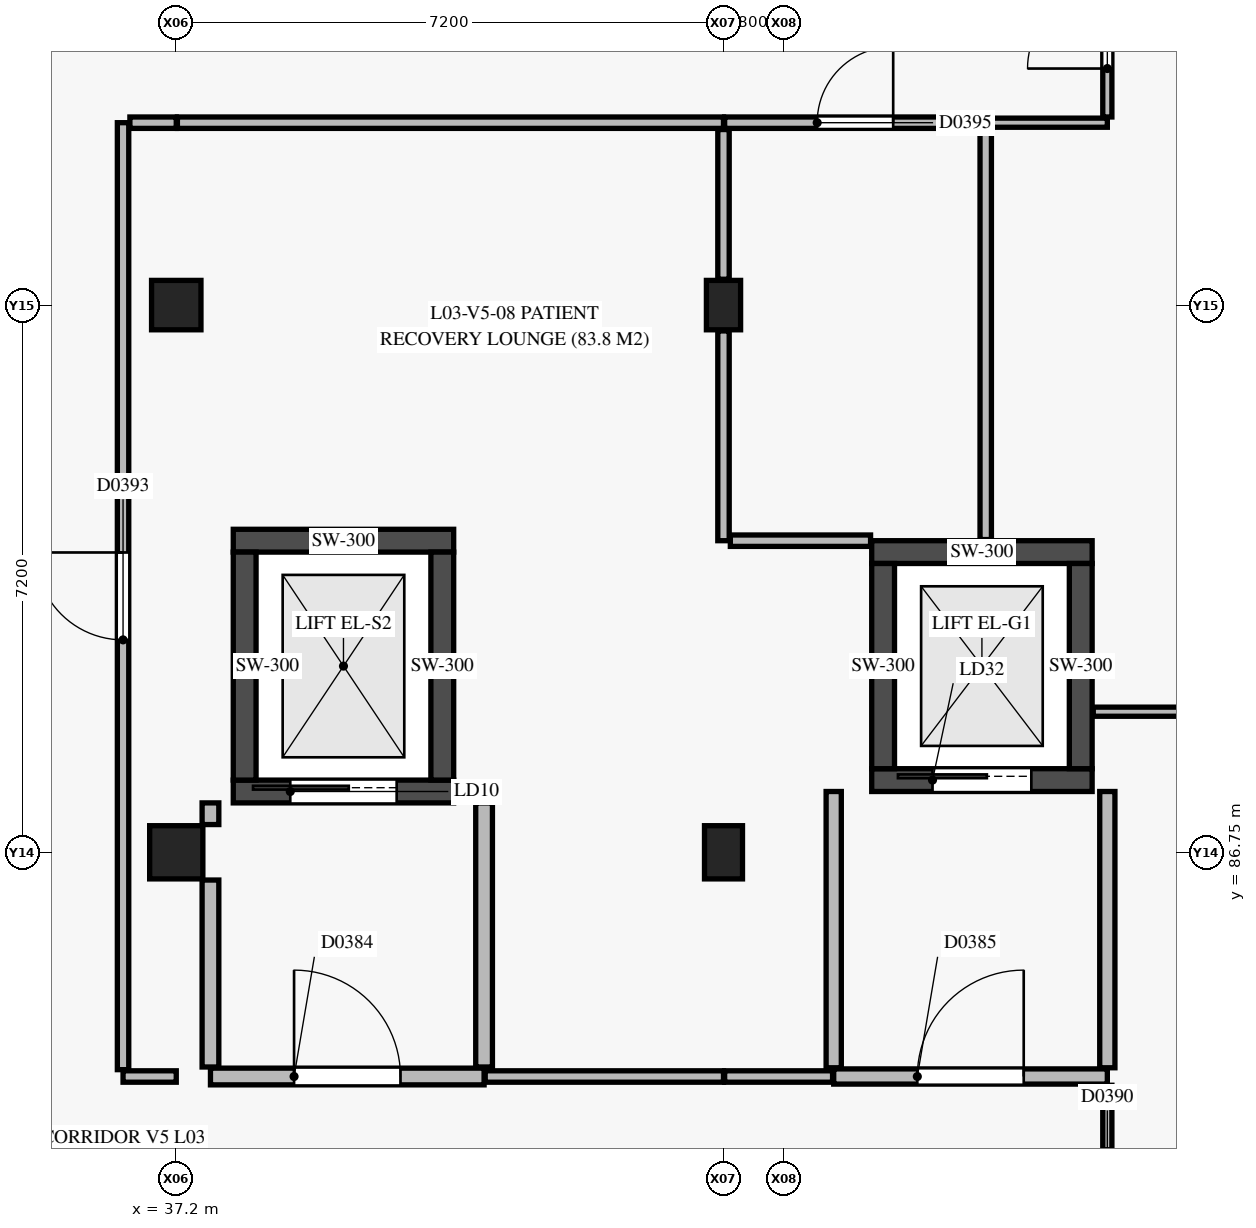
"""IFC4 building model, lengths in metres.
Left out: names, types, materials, properties, quantities, classifications, styles, units other than length and angle.
Written with IfcOpenShell. Run it as: python <this file> out.ifc"""

import sys

from ifc_helpers import new_model, si_unit, direction, frame, frame_2d, origin, origin_2d, place, context, subcontext, project, spatial, rectangle, extrude, element, fill, save


model = new_model("IFC4")
c1 = context("Model", 3, precision=1e-05, world=origin(), true_north=direction((0.0, 1.0)))
c2 = subcontext(c1, "Body", "Model", "MODEL_VIEW")
j1 = project(units=[si_unit("LENGTHUNIT", "METRE"), si_unit("PLANEANGLEUNIT", "RADIAN")], contexts=[c1])
p1 = place(None, origin())
s1 = spatial("IfcSite", under=j1, at=p1, CompositionType="ELEMENT")
p2 = place(p1, origin())
s2 = spatial("IfcBuilding", under=s1, at=p2, CompositionType="ELEMENT")
p3 = place(p2, frame((0.0, 0.0, 13.2)))
s3 = spatial("IfcBuildingStorey", under=s2, at=p3, CompositionType="ELEMENT", Elevation=13.2)
p4 = place(p3, frame((37.2, 86.75, 0.0), z_axis=(0.0, 0.0, 1.0), x_axis=(1.0, 0.0, 0.0)))
e1 = element("IfcColumn", 1, at=p4, inside=s3, PredefinedType="COLUMN", context=c2, shape_type="SweptSolid", body=[
    extrude(rectangle(XDim=0.7, YDim=0.7, at=origin_2d()), origin(), (0.0, 0.0, 1.0), 4.05),
])
p5 = place(p3, frame((37.2, 93.95, 0.0), z_axis=(0.0, 0.0, 1.0), x_axis=(1.0, 0.0, 0.0)))
e2 = element("IfcColumn", 2, at=p5, inside=s3, PredefinedType="COLUMN", context=c2, shape_type="SweptSolid", body=[
    extrude(rectangle(XDim=0.65, YDim=0.65, at=origin_2d()), origin(), (0.0, 0.0, 1.0), 4.05),
])
p6 = place(p3, frame((44.4, 86.75, 0.0), z_axis=(0.0, 0.0, 1.0), x_axis=(1.0, 0.0, 0.0)))
e3 = element("IfcColumn", 3, at=p6, inside=s3, PredefinedType="COLUMN", context=c2, shape_type="SweptSolid", body=[
    extrude(rectangle(XDim=0.5, YDim=0.7, at=origin_2d()), origin(), (0.0, 0.0, 1.0), 4.05),
])
p7 = place(p3, frame((44.4, 93.95, 0.0), z_axis=(0.0, 0.0, 1.0), x_axis=(1.0, 0.0, 0.0)))
e4 = element("IfcColumn", 4, at=p7, inside=s3, PredefinedType="COLUMN", context=c2, shape_type="SweptSolid", body=[
    extrude(rectangle(XDim=0.45, YDim=0.65, at=origin_2d()), origin(), (0.0, 0.0, 1.0), 4.05),
])
p8 = place(p3, frame((37.95, 87.55, 0.0), z_axis=(0.0, 0.0, 1.0), x_axis=(1.0, 0.0, 0.0)))
e5 = element("IfcWall", 5, at=p8, inside=s3, PredefinedType="SHEAR", context=c2, shape_type="SweptSolid", body=[
    extrude(rectangle(XDim=2.9, YDim=0.3, at=frame_2d((1.45, 0.0))), origin(), (0.0, 0.0, 1.0), 3.95),
])
p9 = place(p8, frame((0.75, 0.0, 0.0)))
e6 = element("IfcOpeningElement", 6, at=p9, cuts=e5, PredefinedType="OPENING", context=c2, shape_type="SweptSolid", body=[
    extrude(rectangle(XDim=1.4, YDim=2.15, at=frame_2d((0.7, 1.075))), frame((0.0, 0.16, 0.0), z_axis=(0.0, -1.0, 0.0), x_axis=(1.0, 0.0, 0.0)), (0.0, 0.0, 1.0), 0.32),
])
p10 = place(p3, frame((37.95, 90.85, 0.0), z_axis=(0.0, 0.0, 1.0), x_axis=(1.0, 0.0, 0.0)))
e7 = element("IfcWall", 7, at=p10, inside=s3, PredefinedType="SHEAR", context=c2, shape_type="SweptSolid", body=[
    extrude(rectangle(XDim=2.9, YDim=0.3, at=frame_2d((1.45, 0.0))), origin(), (0.0, 0.0, 1.0), 3.95),
])
for number, where, z_axis, x_axis in (
    (8, (38.1, 87.7, 0.0), (0.0, 0.0, 1.0), (0.0, 1.0, 0.0)),
    (9, (40.7, 87.7, 0.0), (0.0, 0.0, 1.0), (0.0, 1.0, 0.0)),
):
    element("IfcWall", number, at=place(p3, frame(where, z_axis=z_axis, x_axis=x_axis)), inside=s3, PredefinedType="SHEAR", context=c2, shape_type="SweptSolid", body=[
        extrude(rectangle(XDim=3.0, YDim=0.3, at=frame_2d((1.5, 0.0))), origin(), (0.0, 0.0, 1.0), 3.95),
    ])
p11 = place(p3, frame((46.35, 87.7, 0.0), z_axis=(0.0, 0.0, 1.0), x_axis=(1.0, 0.0, 0.0)))
e10 = element("IfcWall", 10, at=p11, inside=s3, PredefinedType="SHEAR", context=c2, shape_type="SweptSolid", body=[
    extrude(rectangle(XDim=2.9, YDim=0.3, at=frame_2d((1.45, 0.0))), origin(), (0.0, 0.0, 1.0), 3.95),
])
p12 = place(p11, frame((0.8, 0.0, 0.0)))
e11 = element("IfcOpeningElement", 11, at=p12, cuts=e10, PredefinedType="OPENING", context=c2, shape_type="SweptSolid", body=[
    extrude(rectangle(XDim=1.3, YDim=2.15, at=frame_2d((0.65, 1.075))), frame((0.0, 0.16, 0.0), z_axis=(0.0, -1.0, 0.0), x_axis=(1.0, 0.0, 0.0)), (0.0, 0.0, 1.0), 0.32),
])
p13 = place(p3, frame((46.35, 90.7, 0.0), z_axis=(0.0, 0.0, 1.0), x_axis=(1.0, 0.0, 0.0)))
e12 = element("IfcWall", 12, at=p13, inside=s3, PredefinedType="SHEAR", context=c2, shape_type="SweptSolid", body=[
    extrude(rectangle(XDim=2.9, YDim=0.3, at=frame_2d((1.45, 0.0))), origin(), (0.0, 0.0, 1.0), 3.95),
])
for number, where, z_axis, x_axis in (
    (13, (46.5, 87.85, 0.0), (0.0, 0.0, 1.0), (0.0, 1.0, 0.0)),
    (14, (49.1, 87.85, 0.0), (0.0, 0.0, 1.0), (0.0, 1.0, 0.0)),
):
    element("IfcWall", number, at=place(p3, frame(where, z_axis=z_axis, x_axis=x_axis)), inside=s3, PredefinedType="SHEAR", context=c2, shape_type="SweptSolid", body=[
        extrude(rectangle(XDim=2.7, YDim=0.3, at=frame_2d((1.35, 0.0))), origin(), (0.0, 0.0, 1.0), 3.95),
    ])
p14 = place(p3, frame((37.65, 83.8, 0.0), z_axis=(0.0, 0.0, 1.0), x_axis=(1.0, 0.0, 0.0)))
e15 = element("IfcWall", 15, at=p14, inside=s3, PredefinedType="PARTITIONING", context=c2, shape_type="SweptSolid", body=[
    extrude(rectangle(XDim=3.6, YDim=0.22, at=frame_2d((1.8, 0.0))), origin(), (0.0, 0.0, 1.0), 3.95),
])
p15 = place(p14, frame((1.1, 0.0, 0.0)))
e16 = element("IfcOpeningElement", 16, at=p15, cuts=e15, PredefinedType="OPENING", context=c2, shape_type="SweptSolid", body=[
    extrude(rectangle(XDim=1.4, YDim=2.2, at=frame_2d((0.7, 1.1))), frame((0.0, 0.12, 0.0), z_axis=(0.0, -1.0, 0.0), x_axis=(1.0, 0.0, 0.0)), (0.0, 0.0, 1.0), 0.24),
])
p16 = place(p3, frame((45.85, 83.8, 0.0), z_axis=(0.0, 0.0, 1.0), x_axis=(1.0, 0.0, 0.0)))
e17 = element("IfcWall", 17, at=p16, inside=s3, PredefinedType="PARTITIONING", context=c2, shape_type="SweptSolid", body=[
    extrude(rectangle(XDim=3.6, YDim=0.2, at=frame_2d((1.8, 0.0))), origin(), (0.0, 0.0, 1.0), 3.95),
])
p17 = place(p16, frame((1.1, 0.0, 0.0)))
e18 = element("IfcOpeningElement", 18, at=p17, cuts=e17, PredefinedType="OPENING", context=c2, shape_type="SweptSolid", body=[
    extrude(rectangle(XDim=1.4, YDim=2.2, at=frame_2d((0.7, 1.1))), frame((0.0, 0.11, 0.0), z_axis=(0.0, -1.0, 0.0), x_axis=(1.0, 0.0, 0.0)), (0.0, 0.0, 1.0), 0.22),
])
p18 = place(p3, frame((41.25, 83.925, 0.0), z_axis=(0.0, 0.0, 1.0), x_axis=(0.0, 1.0, 0.0)))
e19 = element("IfcWall", 19, at=p18, inside=s3, PredefinedType="PARTITIONING", context=c2, shape_type="SweptSolid", body=[
    extrude(rectangle(XDim=3.475, YDim=0.22, at=frame_2d((1.737, 0.0))), origin(), (0.0, 0.0, 1.0), 3.47),
])
p19 = place(p3, frame((37.65, 83.925, 0.0), z_axis=(0.0, 0.0, 1.0), x_axis=(0.0, 1.0, 0.0)))
e20 = element("IfcWall", 20, at=p19, inside=s3, PredefinedType="PARTITIONING", context=c2, shape_type="SweptSolid", body=[
    extrude(rectangle(XDim=2.46, YDim=0.22, at=frame_2d((1.23, 0.0))), origin(), (0.0, 0.0, 1.0), 3.95),
])
p20 = place(p3, frame((37.65, 87.115, 0.0), z_axis=(0.0, 0.0, 1.0), x_axis=(0.0, 1.0, 0.0)))
e21 = element("IfcWall", 21, at=p20, inside=s3, PredefinedType="PARTITIONING", context=c2, shape_type="SweptSolid", body=[
    extrude(rectangle(XDim=0.285, YDim=0.22, at=frame_2d((0.143, 0.0))), origin(), (0.0, 0.0, 1.0), 3.95),
])
for number, where, z_axis, x_axis in (
    (22, (49.45, 83.915, 0.0), (0.0, 0.0, 1.0), (0.0, 1.0, 0.0)),
    (23, (45.85, 83.915, 0.0), (0.0, 0.0, 1.0), (0.0, 1.0, 0.0)),
):
    element("IfcWall", number, at=place(p3, frame(where, z_axis=z_axis, x_axis=x_axis)), inside=s3, PredefinedType="PARTITIONING", context=c2, shape_type="SweptSolid", body=[
        extrude(rectangle(XDim=3.635, YDim=0.2, at=frame_2d((1.817, 0.0))), origin(), (0.0, 0.0, 1.0), 3.22),
    ])
p21 = place(p3, frame((41.265, 83.8, 0.0), z_axis=(0.0, 0.0, 1.0), x_axis=(1.0, 0.0, 0.0)))
e24 = element("IfcWall", 24, at=p21, inside=s3, PredefinedType="PARTITIONING", context=c2, shape_type="SweptSolid", body=[
    extrude(rectangle(XDim=3.135, YDim=0.15, at=frame_2d((1.567, 0.0))), origin(), (0.0, 0.0, 1.0), 3.95),
])
p22 = place(p3, frame((36.5, 83.8, 0.0), z_axis=(0.0, 0.0, 1.0), x_axis=(1.0, 0.0, 0.0)))
e25 = element("IfcWall", 25, at=p22, inside=s3, PredefinedType="PARTITIONING", context=c2, shape_type="SweptSolid", body=[
    extrude(rectangle(XDim=0.7, YDim=0.15, at=frame_2d((0.35, 0.0))), origin(), (0.0, 0.0, 1.0), 3.95),
])
p23 = place(p3, frame((36.5, 83.89, 0.0), z_axis=(0.0, 0.0, 1.0), x_axis=(0.0, 1.0, 0.0)))
e26 = element("IfcWall", 26, at=p23, inside=s3, PredefinedType="PARTITIONING", context=c2, shape_type="SweptSolid", body=[
    extrude(rectangle(XDim=12.46, YDim=0.15, at=frame_2d((6.23, 0.0))), origin(), (0.0, 0.0, 1.0), 3.22),
])
p24 = place(p23, frame((5.655, 0.0, 0.0)))
e27 = element("IfcOpeningElement", 27, at=p24, cuts=e26, PredefinedType="OPENING", context=c2, shape_type="SweptSolid", body=[
    extrude(rectangle(XDim=1.15, YDim=2.15, at=frame_2d((0.575, 1.075))), frame((0.0, 0.085, 0.0), z_axis=(0.0, -1.0, 0.0), x_axis=(1.0, 0.0, 0.0)), (0.0, 0.0, 1.0), 0.17),
])
p25 = place(p3, frame((36.59, 96.35, 0.0), z_axis=(0.0, 0.0, 1.0), x_axis=(1.0, 0.0, 0.0)))
e28 = element("IfcWall", 28, at=p25, inside=s3, PredefinedType="PARTITIONING", context=c2, shape_type="SweptSolid", body=[
    extrude(rectangle(XDim=0.61, YDim=0.15, at=frame_2d((0.305, 0.0))), origin(), (0.0, 0.0, 1.0), 3.95),
])
p26 = place(p3, frame((37.215, 96.35, 0.0), z_axis=(0.0, 0.0, 1.0), x_axis=(1.0, 0.0, 0.0)))
e29 = element("IfcWall", 29, at=p26, inside=s3, PredefinedType="PARTITIONING", context=c2, shape_type="SweptSolid", body=[
    extrude(rectangle(XDim=7.185, YDim=0.15, at=frame_2d((3.592, 0.0))), origin(), (0.0, 0.0, 1.0), 3.95),
])
p27 = place(p3, frame((44.415, 83.8, 0.0), z_axis=(0.0, 0.0, 1.0), x_axis=(1.0, 0.0, 0.0)))
e30 = element("IfcWall", 30, at=p27, inside=s3, PredefinedType="PARTITIONING", context=c2, shape_type="SweptSolid", body=[
    extrude(rectangle(XDim=1.42, YDim=0.15, at=frame_2d((0.71, 0.0))), origin(), (0.0, 0.0, 1.0), 3.95),
])
p28 = place(p3, frame((44.415, 96.35, 0.0), z_axis=(0.0, 0.0, 1.0), x_axis=(1.0, 0.0, 0.0)))
e31 = element("IfcWall", 31, at=p28, inside=s3, PredefinedType="PARTITIONING", context=c2, shape_type="SweptSolid", body=[
    extrude(rectangle(XDim=3.435, YDim=0.15, at=frame_2d((1.718, 0.0))), origin(), (0.0, 0.0, 1.0), 3.95),
])
p29 = place(p28, frame((1.218, 0.0, 0.0)))
e32 = element("IfcOpeningElement", 32, at=p29, cuts=e31, PredefinedType="OPENING", context=c2, shape_type="SweptSolid", body=[
    extrude(rectangle(XDim=1.0, YDim=2.15, at=frame_2d((0.5, 1.075))), frame((0.0, 0.085, 0.0), z_axis=(0.0, -1.0, 0.0), x_axis=(1.0, 0.0, 0.0)), (0.0, 0.0, 1.0), 0.17),
])
p30 = place(p3, frame((49.45, 81.475, 0.0), z_axis=(0.0, 0.0, 1.0), x_axis=(0.0, 1.0, 0.0)))
e33 = element("IfcWall", 33, at=p30, inside=s3, PredefinedType="PARTITIONING", context=c2, shape_type="SweptSolid", body=[
    extrude(rectangle(XDim=2.21, YDim=0.12, at=frame_2d((1.105, 0.0))), origin(), (0.0, 0.0, 1.0), 3.95),
])
p31 = place(p30, frame((0.428, 0.0, 0.0)))
e34 = element("IfcOpeningElement", 34, at=p31, cuts=e33, PredefinedType="OPENING", context=c2, shape_type="SweptSolid", body=[
    extrude(rectangle(XDim=0.95, YDim=2.1, at=frame_2d((0.475, 1.05))), frame((0.0, 0.07, 0.0), z_axis=(0.0, -1.0, 0.0), x_axis=(1.0, 0.0, 0.0)), (0.0, 0.0, 1.0), 0.14),
])
p32 = place(p3, frame((47.865, 96.35, 0.0), z_axis=(0.0, 0.0, 1.0), x_axis=(1.0, 0.0, 0.0)))
e35 = element("IfcWall", 35, at=p32, inside=s3, PredefinedType="PARTITIONING", context=c2, shape_type="SweptSolid", body=[
    extrude(rectangle(XDim=1.585, YDim=0.12, at=frame_2d((0.792, 0.0))), origin(), (0.0, 0.0, 1.0), 3.95),
])
p33 = place(p3, frame((49.45, 96.425, 0.0), z_axis=(0.0, 0.0, 1.0), x_axis=(0.0, 1.0, 0.0)))
e36 = element("IfcWall", 36, at=p33, inside=s3, PredefinedType="PARTITIONING", context=c2, shape_type="SweptSolid", body=[
    extrude(rectangle(XDim=2.325, YDim=0.12, at=frame_2d((1.163, 0.0))), origin(), (0.0, 0.0, 1.0), 3.95),
])
p34 = place(p33, frame((0.637, 0.0, 0.0)))
e37 = element("IfcOpeningElement", 37, at=p34, cuts=e36, PredefinedType="OPENING", context=c2, shape_type="SweptSolid", body=[
    extrude(rectangle(XDim=1.05, YDim=2.15, at=frame_2d((0.525, 1.075))), frame((0.0, 0.07, 0.0), z_axis=(0.0, -1.0, 0.0), x_axis=(1.0, 0.0, 0.0)), (0.0, 0.0, 1.0), 0.14),
])
p35 = place(p3, frame((44.4, 90.85, 0.0), z_axis=(0.0, 0.0, 1.0), x_axis=(0.0, 1.0, 0.0)))
e38 = element("IfcWall", 38, at=p35, inside=s3, PredefinedType="PARTITIONING", context=c2, shape_type="SweptSolid", body=[
    extrude(rectangle(XDim=2.76, YDim=0.15, at=frame_2d((1.38, 0.0))), origin(), (0.0, 0.0, 1.0), 3.95),
])
p36 = place(p3, frame((44.4, 94.29, 0.0), z_axis=(0.0, 0.0, 1.0), x_axis=(0.0, 1.0, 0.0)))
e39 = element("IfcWall", 39, at=p36, inside=s3, PredefinedType="PARTITIONING", context=c2, shape_type="SweptSolid", body=[
    extrude(rectangle(XDim=1.97, YDim=0.15, at=frame_2d((0.985, 0.0))), origin(), (0.0, 0.0, 1.0), 3.95),
])
p37 = place(p3, frame((44.49, 90.85, 0.0), z_axis=(0.0, 0.0, 1.0), x_axis=(1.0, 0.0, 0.0)))
e40 = element("IfcWall", 40, at=p37, inside=s3, PredefinedType="PARTITIONING", context=c2, shape_type="SweptSolid", body=[
    extrude(rectangle(XDim=1.845, YDim=0.15, at=frame_2d((0.922, 0.0))), origin(), (0.0, 0.0, 1.0), 3.95),
])
p38 = place(p3, frame((47.85, 90.865, 0.0), z_axis=(0.0, 0.0, 1.0), x_axis=(0.0, 1.0, 0.0)))
e41 = element("IfcWall", 41, at=p38, inside=s3, PredefinedType="PARTITIONING", context=c2, shape_type="SweptSolid", body=[
    extrude(rectangle(XDim=5.395, YDim=0.15, at=frame_2d((2.698, 0.0))), origin(), (0.0, 0.0, 1.0), 3.44),
])
p39 = place(p3, frame((49.265, 88.6, 0.0), z_axis=(0.0, 0.0, 1.0), x_axis=(1.0, 0.0, 0.0)))
e42 = element("IfcWall", 42, at=p39, inside=s3, PredefinedType="PARTITIONING", context=c2, shape_type="SweptSolid", body=[
    extrude(rectangle(XDim=2.1, YDim=0.12, at=frame_2d((1.05, 0.0))), origin(), (0.0, 0.0, 1.0), 3.95),
])
p40 = place(p9, origin())
e43 = element("IfcDoor", 43, at=p40, inside=s3, OperationType="SLIDING_TO_LEFT", PredefinedType="DOOR", context=c2, shape_type="SweptSolid", body=[
    extrude(rectangle(XDim=1.4, YDim=2.15, at=frame_2d((0.7, 1.075))), frame((0.0, 0.025, 0.0), z_axis=(0.0, -1.0, 0.0), x_axis=(1.0, 0.0, 0.0)), (0.0, 0.0, 1.0), 0.05),
])
fill(e6, e43)
p41 = place(p12, origin())
e44 = element("IfcDoor", 44, at=p41, inside=s3, OperationType="SLIDING_TO_LEFT", PredefinedType="DOOR", context=c2, shape_type="SweptSolid", body=[
    extrude(rectangle(XDim=1.3, YDim=2.15, at=frame_2d((0.65, 1.075))), frame((0.0, 0.025, 0.0), z_axis=(0.0, -1.0, 0.0), x_axis=(1.0, 0.0, 0.0)), (0.0, 0.0, 1.0), 0.05),
])
fill(e11, e44)
p42 = place(p15, origin())
e45 = element("IfcDoor", 45, at=p42, inside=s3, OperationType="SINGLE_SWING_LEFT", PredefinedType="DOOR", context=c2, shape_type="SweptSolid", body=[
    extrude(rectangle(XDim=1.4, YDim=2.2, at=frame_2d((0.7, 1.1))), frame((0.0, 0.025, 0.0), z_axis=(0.0, -1.0, 0.0), x_axis=(1.0, 0.0, 0.0)), (0.0, 0.0, 1.0), 0.05),
])
fill(e16, e45)
p43 = place(p17, origin())
e46 = element("IfcDoor", 46, at=p43, inside=s3, OperationType="SINGLE_SWING_RIGHT", PredefinedType="DOOR", context=c2, shape_type="SweptSolid", body=[
    extrude(rectangle(XDim=1.4, YDim=2.2, at=frame_2d((0.7, 1.1))), frame((0.0, 0.025, 0.0), z_axis=(0.0, -1.0, 0.0), x_axis=(1.0, 0.0, 0.0)), (0.0, 0.0, 1.0), 0.05),
])
fill(e18, e46)
p44 = place(p24, origin())
e47 = element("IfcDoor", 47, at=p44, inside=s3, OperationType="SINGLE_SWING_RIGHT", PredefinedType="DOOR", context=c2, shape_type="SweptSolid", body=[
    extrude(rectangle(XDim=1.15, YDim=2.15, at=frame_2d((0.575, 1.075))), frame((0.0, 0.025, 0.0), z_axis=(0.0, -1.0, 0.0), x_axis=(1.0, 0.0, 0.0)), (0.0, 0.0, 1.0), 0.05),
])
fill(e27, e47)
p45 = place(p34, origin())
e48 = element("IfcDoor", 48, at=p45, inside=s3, OperationType="SINGLE_SWING_LEFT", PredefinedType="DOOR", context=c2, shape_type="SweptSolid", body=[
    extrude(rectangle(XDim=1.05, YDim=2.15, at=frame_2d((0.525, 1.075))), frame((0.0, 0.025, 0.0), z_axis=(0.0, -1.0, 0.0), x_axis=(1.0, 0.0, 0.0)), (0.0, 0.0, 1.0), 0.05),
])
fill(e37, e48)
p46 = place(p29, origin())
e49 = element("IfcDoor", 49, at=p46, inside=s3, OperationType="SINGLE_SWING_RIGHT", PredefinedType="DOOR", context=c2, shape_type="SweptSolid", body=[
    extrude(rectangle(XDim=1.0, YDim=2.15, at=frame_2d((0.5, 1.075))), frame((0.0, 0.025, 0.0), z_axis=(0.0, -1.0, 0.0), x_axis=(1.0, 0.0, 0.0)), (0.0, 0.0, 1.0), 0.05),
])
fill(e32, e49)
save(model, sys.argv[1])
